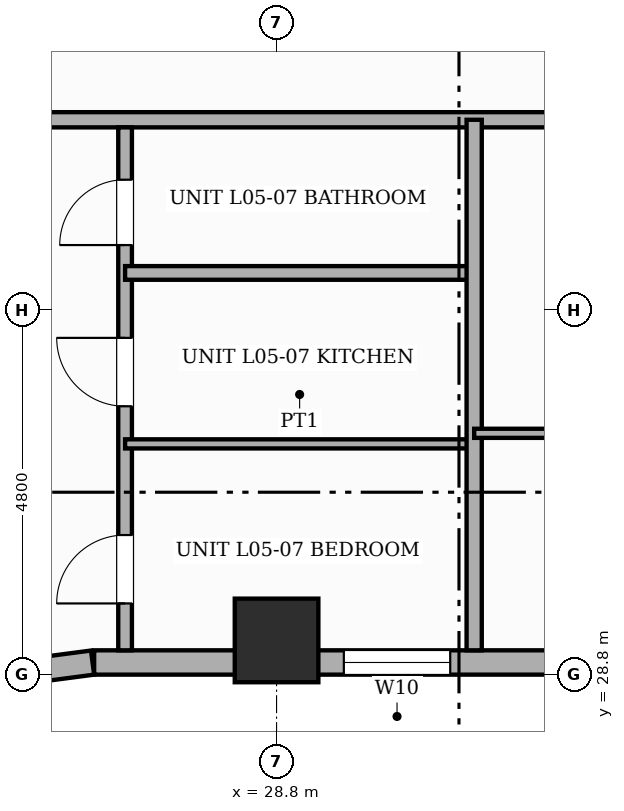
"""IFC4 building model, lengths in metres.
Left out: names, types, materials, properties, quantities, classifications, styles, units other than length and angle.
Written with IfcOpenShell. Run it as: python <this file> out.ifc"""

import sys

from ifc_helpers import new_model, si_unit, direction, frame, frame_2d, origin, origin_2d, place, context, subcontext, project, spatial, rectangle, extrude, element, fill, save


model = new_model("IFC4")
c1 = context("Model", 3, precision=1e-05, world=origin(), true_north=direction((0.0, 1.0)))
c2 = subcontext(c1, "Body", "Model", "MODEL_VIEW")
j1 = project(units=[si_unit("LENGTHUNIT", "METRE"), si_unit("PLANEANGLEUNIT", "RADIAN")], contexts=[c1])
p1 = place(None, origin())
s1 = spatial("IfcSite", under=j1, at=p1, CompositionType="ELEMENT")
p2 = place(p1, origin())
s2 = spatial("IfcBuilding", under=s1, at=p2, CompositionType="ELEMENT")
p3 = place(p2, frame((0.0, 0.0, 25.0)))
s3 = spatial("IfcBuildingStorey", under=s2, at=p3, CompositionType="ELEMENT", Elevation=25.0)
p4 = place(p3, frame((28.8, 29.25, 0.0), z_axis=(0.0, 0.0, 1.0), x_axis=(1.0, 0.0, 0.0)))
e1 = element("IfcColumn", 1, at=p4, inside=s3, PredefinedType="COLUMN", context=c2, shape_type="SweptSolid", body=[
    extrude(rectangle(XDim=1.1, YDim=1.1, at=origin_2d()), origin(), (0.0, 0.0, 1.0), 3.6),
])
p5 = place(p3, frame((55.2, 28.96, 0.0), z_axis=(0.0, 0.0, 1.0), x_axis=(-1.0, 0.0, 0.0)))
e2 = element("IfcWall", 2, at=p5, inside=s3, PredefinedType="STANDARD", context=c2, shape_type="SweptSolid", body=[
    extrude(rectangle(XDim=28.8, YDim=0.32, at=frame_2d((14.4, 0.0))), origin(), (0.0, 0.0, 1.0), 2.53),
])
p6 = place(p5, frame((24.115, 0.0, 0.65)))
e3 = element("IfcOpeningElement", 3, at=p6, cuts=e2, PredefinedType="OPENING", context=c2, shape_type="SweptSolid", body=[
    extrude(rectangle(XDim=1.4, YDim=1.1, at=frame_2d((0.7, 0.55))), frame((0.0, 0.17, 0.0), z_axis=(0.0, -1.0, 0.0), x_axis=(1.0, 0.0, 0.0)), (0.0, 0.0, 1.0), 0.34),
])
p7 = place(p5, frame((12.991, 0.0, 0.65)))
e4 = element("IfcOpeningElement", 4, at=p7, cuts=e2, PredefinedType="OPENING", context=c2, shape_type="SweptSolid", body=[
    extrude(rectangle(XDim=1.4, YDim=1.1, at=frame_2d((0.7, 0.55))), frame((0.0, 0.17, 0.0), z_axis=(0.0, -1.0, 0.0), x_axis=(1.0, 0.0, 0.0)), (0.0, 0.0, 1.0), 0.34),
])
p8 = place(p5, frame((19.869, 0.0, 0.45)))
e5 = element("IfcOpeningElement", 5, at=p8, cuts=e2, PredefinedType="OPENING", context=c2, shape_type="SweptSolid", body=[
    extrude(rectangle(XDim=0.95, YDim=1.8, at=frame_2d((0.475, 0.9))), frame((0.0, 0.17, 0.0), z_axis=(0.0, -1.0, 0.0), x_axis=(1.0, 0.0, 0.0)), (0.0, 0.0, 1.0), 0.34),
])
p9 = place(p5, frame((4.79, 0.0, 0.65)))
e6 = element("IfcOpeningElement", 6, at=p9, cuts=e2, PredefinedType="OPENING", context=c2, shape_type="SweptSolid", body=[
    extrude(rectangle(XDim=1.4, YDim=1.1, at=frame_2d((0.7, 0.55))), frame((0.0, 0.17, 0.0), z_axis=(0.0, -1.0, 0.0), x_axis=(1.0, 0.0, 0.0)), (0.0, 0.0, 1.0), 0.34),
])
p10 = place(p5, frame((0.47, 0.0, 0.65)))
e7 = element("IfcOpeningElement", 7, at=p10, cuts=e2, PredefinedType="OPENING", context=c2, shape_type="SweptSolid", body=[
    extrude(rectangle(XDim=1.4, YDim=1.1, at=frame_2d((0.7, 0.55))), frame((0.0, 0.17, 0.0), z_axis=(0.0, -1.0, 0.0), x_axis=(1.0, 0.0, 0.0)), (0.0, 0.0, 1.0), 0.34),
])
p11 = place(p5, frame((15.046, 0.0, 0.45)))
e8 = element("IfcOpeningElement", 8, at=p11, cuts=e2, PredefinedType="OPENING", context=c2, shape_type="SweptSolid", body=[
    extrude(rectangle(XDim=0.95, YDim=1.8, at=frame_2d((0.475, 0.9))), frame((0.0, 0.17, 0.0), z_axis=(0.0, -1.0, 0.0), x_axis=(1.0, 0.0, 0.0)), (0.0, 0.0, 1.0), 0.34),
])
p12 = place(p3, frame((26.379, 28.958, 0.0), z_axis=(0.0, 0.0, 1.0), x_axis=(-0.991447664465, -0.130504898859, 0.0)))
e9 = element("IfcWall", 9, at=p12, inside=s3, PredefinedType="STANDARD", context=c2, shape_type="SweptSolid", body=[
    extrude(rectangle(XDim=0.627, YDim=0.32, at=frame_2d((0.313, 0.0))), origin(), (0.0, 0.0, 1.0), 2.53),
])
p13 = place(p3, frame((22.75, 36.1, 0.0), z_axis=(0.0, 0.0, 1.0), x_axis=(1.0, 0.0, 0.0)))
e10 = element("IfcWall", 10, at=p13, inside=s3, PredefinedType="PARTITIONING", context=c2, shape_type="SweptSolid", body=[
    extrude(rectangle(XDim=21.27, YDim=0.2, at=frame_2d((10.635, 0.0))), origin(), (0.0, 0.0, 1.0), 3.35),
])
p14 = place(p13, frame((1.628, 0.0, 0.0)))
e11 = element("IfcOpeningElement", 11, at=p14, cuts=e10, PredefinedType="OPENING", context=c2, shape_type="SweptSolid", body=[
    extrude(rectangle(XDim=0.98, YDim=2.18, at=frame_2d((0.49, 1.09))), frame((0.0, 0.11, 0.0), z_axis=(0.0, -1.0, 0.0), x_axis=(1.0, 0.0, 0.0)), (0.0, 0.0, 1.0), 0.22),
])
p15 = place(p13, frame((14.725, 0.0, 0.0)))
e12 = element("IfcOpeningElement", 12, at=p15, cuts=e10, PredefinedType="OPENING", context=c2, shape_type="SweptSolid", body=[
    extrude(rectangle(XDim=0.98, YDim=2.18, at=frame_2d((0.49, 1.09))), frame((0.0, 0.11, 0.0), z_axis=(0.0, -1.0, 0.0), x_axis=(1.0, 0.0, 0.0)), (0.0, 0.0, 1.0), 0.22),
])
p16 = place(p3, frame((26.807, 29.12, 0.0), z_axis=(0.0, 0.0, 1.0), x_axis=(0.0, 1.0, 0.0)))
e13 = element("IfcWall", 13, at=p16, inside=s3, PredefinedType="PLUMBINGWALL", context=c2, shape_type="SweptSolid", body=[
    extrude(rectangle(XDim=6.88, YDim=0.18, at=frame_2d((3.44, 0.0))), origin(), (0.0, 0.0, 1.0), 3.35),
])
p17 = place(p16, frame((0.617, 0.0, 0.0)))
e14 = element("IfcOpeningElement", 14, at=p17, cuts=e13, PredefinedType="OPENING", context=c2, shape_type="SweptSolid", body=[
    extrude(rectangle(XDim=0.9, YDim=2.15, at=frame_2d((0.45, 1.075))), frame((0.0, 0.1, 0.0), z_axis=(0.0, -1.0, 0.0), x_axis=(1.0, 0.0, 0.0)), (0.0, 0.0, 1.0), 0.2),
])
p18 = place(p16, frame((3.21, 0.0, 0.0)))
e15 = element("IfcOpeningElement", 15, at=p18, cuts=e13, PredefinedType="OPENING", context=c2, shape_type="SweptSolid", body=[
    extrude(rectangle(XDim=0.9, YDim=2.15, at=frame_2d((0.45, 1.075))), frame((0.0, 0.1, 0.0), z_axis=(0.0, -1.0, 0.0), x_axis=(1.0, 0.0, 0.0)), (0.0, 0.0, 1.0), 0.2),
])
p19 = place(p16, frame((5.332, 0.0, 0.0)))
e16 = element("IfcOpeningElement", 16, at=p19, cuts=e13, PredefinedType="OPENING", context=c2, shape_type="SweptSolid", body=[
    extrude(rectangle(XDim=0.86, YDim=2.1, at=frame_2d((0.43, 1.05))), frame((0.0, 0.1, 0.0), z_axis=(0.0, -1.0, 0.0), x_axis=(1.0, 0.0, 0.0)), (0.0, 0.0, 1.0), 0.2),
])
p20 = place(p3, frame((26.807, 31.836, 0.0), z_axis=(0.0, 0.0, 1.0), x_axis=(1.0, 0.0, 0.0)))
e17 = element("IfcWall", 17, at=p20, inside=s3, PredefinedType="PARTITIONING", context=c2, shape_type="SweptSolid", body=[
    extrude(rectangle(XDim=4.593, YDim=0.12, at=frame_2d((2.296, 0.0))), origin(), (0.0, 0.0, 1.0), 3.35),
])
p21 = place(p3, frame((26.807, 34.085, 0.0), z_axis=(0.0, 0.0, 1.0), x_axis=(1.0, 0.0, 0.0)))
e18 = element("IfcWall", 18, at=p21, inside=s3, PredefinedType="PLUMBINGWALL", context=c2, shape_type="SweptSolid", body=[
    extrude(rectangle(XDim=4.593, YDim=0.18, at=frame_2d((2.296, 0.0))), origin(), (0.0, 0.0, 1.0), 3.35),
])
p22 = place(p3, frame((31.4, 29.12, 0.0), z_axis=(0.0, 0.0, 1.0), x_axis=(0.0, 1.0, 0.0)))
e19 = element("IfcWall", 19, at=p22, inside=s3, PredefinedType="SOLIDWALL", context=c2, shape_type="SweptSolid", body=[
    extrude(rectangle(XDim=6.98, YDim=0.2, at=frame_2d((3.49, 0.0))), origin(), (0.0, 0.0, 1.0), 3.35),
])
p23 = place(p3, frame((31.4, 31.975, 0.0), z_axis=(0.0, 0.0, 1.0), x_axis=(1.0, 0.0, 0.0)))
e20 = element("IfcWall", 20, at=p23, inside=s3, PredefinedType="PARTITIONING", context=c2, shape_type="SweptSolid", body=[
    extrude(rectangle(XDim=4.141, YDim=0.12, at=frame_2d((2.071, 0.0))), origin(), (0.0, 0.0, 1.0), 3.35),
])
p24 = place(p6, origin())
e21 = element("IfcWindow", 21, at=p24, inside=s3, PartitioningType="SINGLE_PANEL", PredefinedType="WINDOW", context=c2, shape_type="SweptSolid", body=[
    extrude(rectangle(XDim=1.4, YDim=1.1, at=frame_2d((0.7, 0.55))), frame((0.0, 0.03, 0.0), z_axis=(0.0, -1.0, 0.0), x_axis=(1.0, 0.0, 0.0)), (0.0, 0.0, 1.0), 0.06),
])
fill(e3, e21)
p25 = place(p17, origin())
e22 = element("IfcDoor", 22, at=p25, inside=s3, OperationType="SINGLE_SWING_LEFT", PredefinedType="DOOR", context=c2, shape_type="SweptSolid", body=[
    extrude(rectangle(XDim=0.9, YDim=2.15, at=frame_2d((0.45, 1.075))), frame((0.0, 0.025, 0.0), z_axis=(0.0, -1.0, 0.0), x_axis=(1.0, 0.0, 0.0)), (0.0, 0.0, 1.0), 0.05),
])
fill(e14, e22)
p26 = place(p18, origin())
e23 = element("IfcDoor", 23, at=p26, inside=s3, OperationType="SINGLE_SWING_RIGHT", PredefinedType="DOOR", context=c2, shape_type="SweptSolid", body=[
    extrude(rectangle(XDim=0.9, YDim=2.15, at=frame_2d((0.45, 1.075))), frame((0.0, 0.025, 0.0), z_axis=(0.0, -1.0, 0.0), x_axis=(1.0, 0.0, 0.0)), (0.0, 0.0, 1.0), 0.05),
])
fill(e15, e23)
p27 = place(p19, origin())
e24 = element("IfcDoor", 24, at=p27, inside=s3, OperationType="SINGLE_SWING_LEFT", PredefinedType="DOOR", context=c2, shape_type="SweptSolid", body=[
    extrude(rectangle(XDim=0.86, YDim=2.1, at=frame_2d((0.43, 1.05))), frame((0.0, 0.025, 0.0), z_axis=(0.0, -1.0, 0.0), x_axis=(1.0, 0.0, 0.0)), (0.0, 0.0, 1.0), 0.05),
])
fill(e16, e24)
save(model, sys.argv[1])
